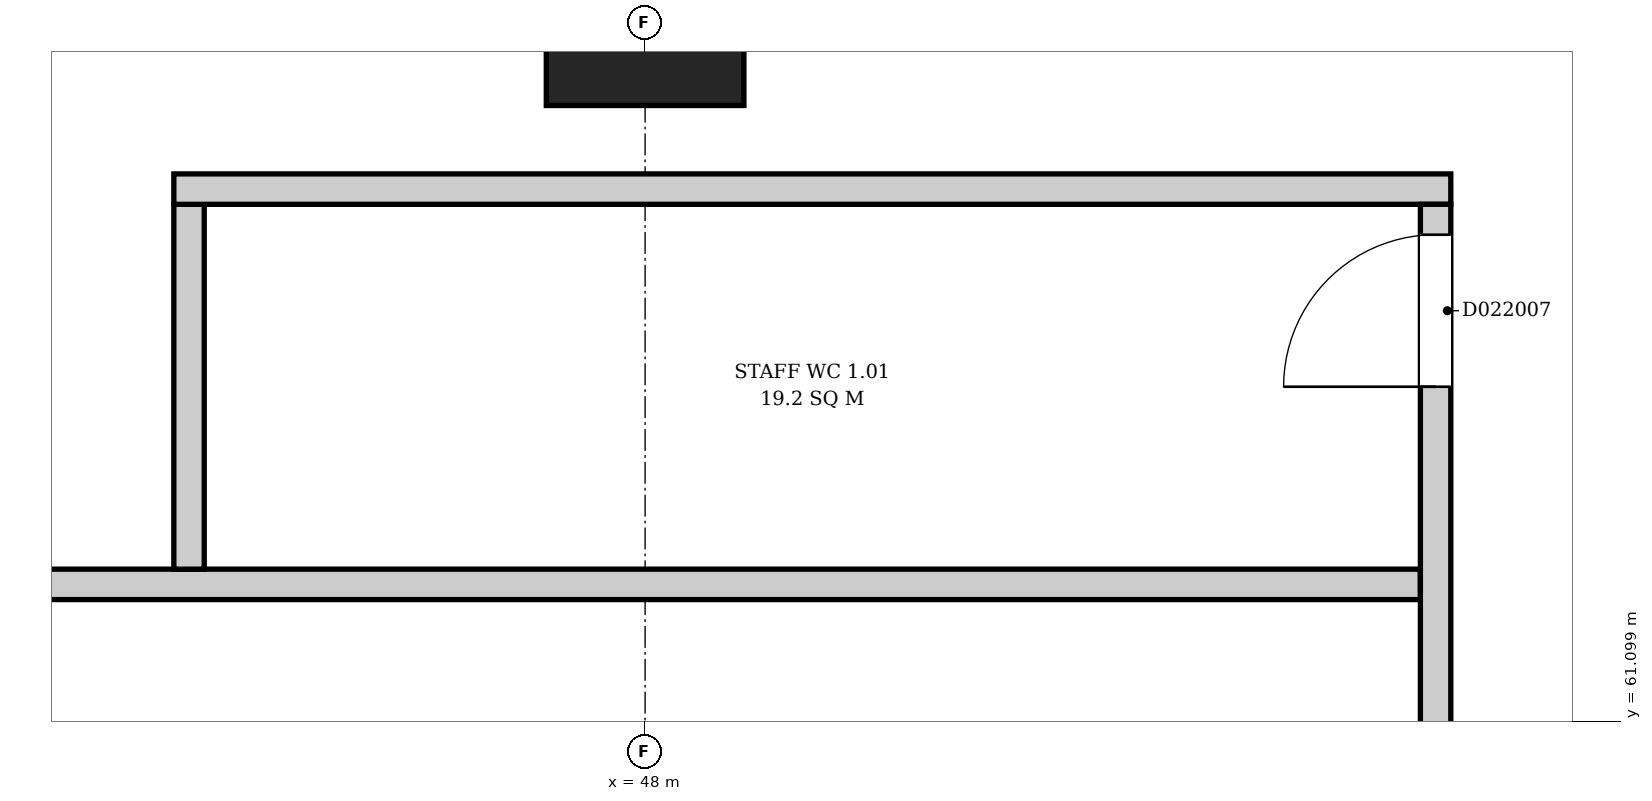
"""IFC4 building model, lengths in metres.
Left out: names, types, materials, properties, quantities, classifications, styles, units other than length and angle.
Written with IfcOpenShell. Run it as: python <this file> out.ifc"""

import sys

from ifc_helpers import new_model, si_unit, direction, frame, frame_2d, origin, origin_2d, place, context, subcontext, project, spatial, rectangle, extrude, element, fill, save


model = new_model("IFC4")
c1 = context("Model", 3, precision=1e-05, world=origin(), true_north=direction((0.0, 1.0)))
c2 = subcontext(c1, "Body", "Model", "MODEL_VIEW")
j1 = project(units=[si_unit("LENGTHUNIT", "METRE"), si_unit("PLANEANGLEUNIT", "RADIAN")], contexts=[c1])
p1 = place(None, origin())
s1 = spatial("IfcSite", under=j1, at=p1, CompositionType="ELEMENT")
p2 = place(p1, origin())
s2 = spatial("IfcBuilding", under=s1, at=p2, CompositionType="ELEMENT")
p3 = place(p2, frame((0.0, 0.0, 6.5)))
s3 = spatial("IfcBuildingStorey", under=s2, at=p3, CompositionType="ELEMENT", Elevation=6.5)
p4 = place(p3, frame((48.0, 65.8, 0.0), z_axis=(0.0, 0.0, 1.0), x_axis=(1.0, 0.0, 0.0)))
e1 = element("IfcColumn", 1, at=p4, inside=s3, PredefinedType="COLUMN", context=c2, shape_type="SweptSolid", body=[
    extrude(rectangle(XDim=1.3, YDim=1.3, at=origin_2d()), origin(), (0.0, 0.0, 1.0), 7.7),
])
p5 = place(p3, frame((4.5, 62.0, 0.0), z_axis=(0.0, 0.0, 1.0), x_axis=(1.0, 0.0, 0.0)))
e2 = element("IfcWall", 2, at=p5, inside=s3, PredefinedType="PARTITIONING", context=c2, shape_type="SweptSolid", body=[
    extrude(rectangle(XDim=48.6, YDim=0.2, at=frame_2d((24.3, 0.0))), origin(), (0.0, 0.0, 1.0), 5.1),
])
p6 = place(p3, frame((45.0, 62.1, 0.0), z_axis=(0.0, 0.0, 1.0), x_axis=(0.0, 1.0, 0.0)))
e3 = element("IfcWall", 3, at=p6, inside=s3, PredefinedType="PARTITIONING", context=c2, shape_type="SweptSolid", body=[
    extrude(rectangle(XDim=2.4, YDim=0.2, at=frame_2d((1.2, 0.0))), origin(), (0.0, 0.0, 1.0), 5.1),
])
p7 = place(p3, frame((44.9, 64.6, 0.0), z_axis=(0.0, 0.0, 1.0), x_axis=(1.0, 0.0, 0.0)))
e4 = element("IfcWall", 4, at=p7, inside=s3, PredefinedType="PARTITIONING", context=c2, shape_type="SweptSolid", body=[
    extrude(rectangle(XDim=8.4, YDim=0.2, at=frame_2d((4.2, 0.0))), origin(), (0.0, 0.0, 1.0), 5.1),
])
p8 = place(p3, frame((53.2, 49.1, 0.0), z_axis=(0.0, 0.0, 1.0), x_axis=(0.0, 1.0, 0.0)))
e5 = element("IfcWall", 5, at=p8, inside=s3, PredefinedType="PARTITIONING", context=c2, shape_type="SweptSolid", body=[
    extrude(rectangle(XDim=15.4, YDim=0.2, at=frame_2d((7.7, 0.0))), origin(), (0.0, 0.0, 1.0), 7.35),
])
p9 = place(p8, frame((14.2, 0.0, 0.0)))
e6 = element("IfcOpeningElement", 6, at=p9, cuts=e5, PredefinedType="OPENING", context=c2, shape_type="SweptSolid", body=[
    extrude(rectangle(XDim=1.0, YDim=2.1, at=frame_2d((0.5, 1.05))), frame((0.0, 0.11, 0.0), z_axis=(0.0, -1.0, 0.0), x_axis=(1.0, 0.0, 0.0)), (0.0, 0.0, 1.0), 0.22),
])
p10 = place(p9, origin())
e7 = element("IfcDoor", 7, at=p10, inside=s3, OperationType="SINGLE_SWING_RIGHT", PredefinedType="DOOR", context=c2, shape_type="SweptSolid", body=[
    extrude(rectangle(XDim=1.0, YDim=2.1, at=frame_2d((0.5, 1.05))), frame((0.0, 0.025, 0.0), z_axis=(0.0, -1.0, 0.0), x_axis=(1.0, 0.0, 0.0)), (0.0, 0.0, 1.0), 0.05),
])
fill(e6, e7)
save(model, sys.argv[1])
